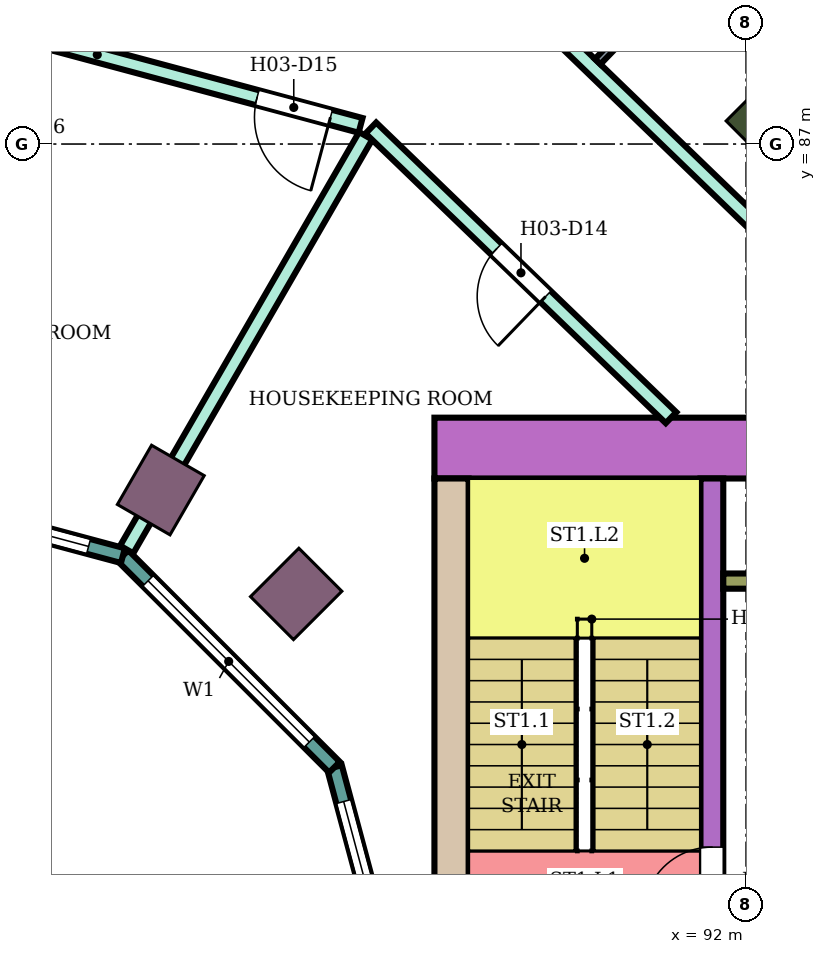
"""IFC4 building model, lengths in metres.
Left out: names, types, materials, properties, quantities, classifications, styles, units other than length and angle.
Written with IfcOpenShell. Run it as: python <this file> out.ifc"""

import sys

from ifc_helpers import new_model, si_unit, direction, frame, frame_2d, origin, origin_2d, place, context, subcontext, project, spatial, rectangle, extrude, element, fill, save


model = new_model("IFC4")
c1 = context("Model", 3, precision=1e-05, world=origin(), true_north=direction((0.0, 1.0)))
c2 = subcontext(c1, "Body", "Model", "MODEL_VIEW")
j1 = project(units=[si_unit("LENGTHUNIT", "METRE"), si_unit("PLANEANGLEUNIT", "RADIAN")], contexts=[c1])
p1 = place(None, origin())
s1 = spatial("IfcSite", under=j1, at=p1, CompositionType="ELEMENT")
p2 = place(p1, origin())
s2 = spatial("IfcBuilding", under=s1, at=p2, CompositionType="ELEMENT")
p3 = place(p2, frame((0.0, 0.0, 55.4)))
s3 = spatial("IfcBuildingStorey", under=s2, at=p3, CompositionType="ELEMENT", Elevation=55.4)
p4 = place(p3, frame((92.445, 87.445, 0.0), z_axis=(0.0, 0.0, 1.0), x_axis=(0.707106781187, 0.707106781187, 0.0)))
e1 = element("IfcColumn", 1, at=p4, inside=s3, PredefinedType="COLUMN", context=c2, shape_type="SweptSolid", body=[
    extrude(rectangle(XDim=1.2, YDim=0.8, at=origin_2d()), origin(), (0.0, 0.0, 1.0), 3.8),
])
for number, where, z_axis, x_axis in (
    (2, (86.081, 81.081, 0.0), (0.0, 0.0, 1.0), (0.707, 0.707, 0.0)),
    (3, (84.3, 82.448, 0.0), (0.0, 0.0, 1.0), (0.5, 0.866, 0.0)),
):
    element("IfcColumn", number, at=place(p3, frame(where, z_axis=z_axis, x_axis=x_axis)), inside=s3, PredefinedType="COLUMN", context=c2, shape_type="SweptSolid", body=[
        extrude(rectangle(XDim=0.9, YDim=0.8, at=origin_2d()), origin(), (0.0, 0.0, 1.0), 3.8),
    ])
p5 = place(p3, frame((87.9, 83.0, 0.0), z_axis=(0.0, 0.0, 1.0), x_axis=(1.0, 0.0, 0.0)))
e4 = element("IfcWall", 4, at=p5, inside=s3, PredefinedType="SHEAR", context=c2, shape_type="SweptSolid", body=[
    extrude(rectangle(XDim=14.7, YDim=0.8, at=frame_2d((7.35, 0.0))), origin(), (0.0, 0.0, 1.0), 3.48),
])
p6 = place(p5, frame((4.2, 0.0, 0.0)))
e5 = element("IfcOpeningElement", 5, at=p6, cuts=e4, PredefinedType="OPENING", context=c2, shape_type="SweptSolid", body=[
    extrude(rectangle(XDim=2.4, YDim=2.4, at=frame_2d((1.2, 1.2))), frame((0.0, 0.41, 0.0), z_axis=(0.0, -1.0, 0.0), x_axis=(1.0, 0.0, 0.0)), (0.0, 0.0, 1.0), 0.82),
])
p7 = place(p3, frame((88.125, 75.0, 0.0), z_axis=(0.0, 0.0, 1.0), x_axis=(0.0, 1.0, 0.0)))
e6 = element("IfcWall", 6, at=p7, inside=s3, PredefinedType="SHEAR", context=c2, shape_type="SweptSolid", body=[
    extrude(rectangle(XDim=7.6, YDim=0.45, at=frame_2d((3.8, 0.0))), origin(), (0.0, 0.0, 1.0), 3.48),
])
p8 = place(p3, frame((91.55, 75.0, 0.0), z_axis=(0.0, 0.0, 1.0), x_axis=(0.0, 1.0, 0.0)))
e7 = element("IfcWall", 7, at=p8, inside=s3, PredefinedType="SHEAR", context=c2, shape_type="SweptSolid", body=[
    extrude(rectangle(XDim=7.6, YDim=0.3, at=frame_2d((3.8, 0.0))), origin(), (0.0, 0.0, 1.0), 3.48),
])
p9 = place(p8, frame((1.85, 0.0, 0.0)))
e8 = element("IfcOpeningElement", 8, at=p9, cuts=e7, PredefinedType="OPENING", context=c2, shape_type="SweptSolid", body=[
    extrude(rectangle(XDim=0.9, YDim=2.1, at=frame_2d((0.45, 1.05))), frame((0.0, 0.16, 0.0), z_axis=(0.0, -1.0, 0.0), x_axis=(1.0, 0.0, 0.0)), (0.0, 0.0, 1.0), 0.32),
])
p10 = place(p3, frame((91.7, 81.25, 0.0), z_axis=(0.0, 0.0, 1.0), x_axis=(1.0, 0.0, 0.0)))
e9 = element("IfcWall", 9, at=p10, inside=s3, PredefinedType="SHEAR", context=c2, shape_type="SweptSolid", body=[
    extrude(rectangle(XDim=4.65, YDim=0.2, at=frame_2d((2.325, 0.0))), origin(), (0.0, 0.0, 1.0), 3.48),
])
p11 = place(p3, frame((87.604, 75.0, 0.0), z_axis=(0.0, 0.0, 1.0), x_axis=(-0.258789828301, 0.965933654434, 0.0)))
e10 = element("IfcWall", 10, at=p11, inside=s3, PredefinedType="NOTDEFINED", context=c2, shape_type="SweptSolid", body=[
    extrude(rectangle(XDim=3.936, YDim=0.2, at=frame_2d((1.968, 0.0))), origin(), (0.0, 0.0, 1.0), 3.8),
])
p12 = place(p11, frame((0.468, 0.0, 0.9)))
e11 = element("IfcOpeningElement", 11, at=p12, cuts=e10, PredefinedType="OPENING", context=c2, shape_type="SweptSolid", body=[
    extrude(rectangle(XDim=3.0, YDim=2.3, at=frame_2d((1.5, 1.15))), frame((0.0, 0.11, 0.0), z_axis=(0.0, -1.0, 0.0), x_axis=(1.0, 0.0, 0.0)), (0.0, 0.0, 1.0), 0.22),
])
p13 = place(p3, frame((86.585, 78.802, 0.0), z_axis=(0.0, 0.0, 1.0), x_axis=(-0.707106781187, 0.707106781187, 0.0)))
e12 = element("IfcWall", 12, at=p13, inside=s3, PredefinedType="NOTDEFINED", context=c2, shape_type="SweptSolid", body=[
    extrude(rectangle(XDim=3.936, YDim=0.2, at=frame_2d((1.968, 0.0))), origin(), (0.0, 0.0, 1.0), 3.8),
])
p14 = place(p13, frame((0.468, 0.0, 0.9)))
e13 = element("IfcOpeningElement", 13, at=p14, cuts=e12, PredefinedType="OPENING", context=c2, shape_type="SweptSolid", body=[
    extrude(rectangle(XDim=3.0, YDim=2.3, at=frame_2d((1.5, 1.15))), frame((0.0, 0.11, 0.0), z_axis=(0.0, -1.0, 0.0), x_axis=(1.0, 0.0, 0.0)), (0.0, 0.0, 1.0), 0.22),
])
p15 = place(p3, frame((83.802, 81.585, 0.0), z_axis=(0.0, 0.0, 1.0), x_axis=(-0.965933654434, 0.258789828301, 0.0)))
e14 = element("IfcWall", 14, at=p15, inside=s3, PredefinedType="NOTDEFINED", context=c2, shape_type="SweptSolid", body=[
    extrude(rectangle(XDim=3.936, YDim=0.2, at=frame_2d((1.968, 0.0))), origin(), (0.0, 0.0, 1.0), 3.8),
])
p16 = place(p15, frame((0.468, 0.0, 0.9)))
e15 = element("IfcOpeningElement", 15, at=p16, cuts=e14, PredefinedType="OPENING", context=c2, shape_type="SweptSolid", body=[
    extrude(rectangle(XDim=3.0, YDim=2.3, at=frame_2d((1.5, 1.15))), frame((0.0, 0.11, 0.0), z_axis=(0.0, -1.0, 0.0), x_axis=(1.0, 0.0, 0.0)), (0.0, 0.0, 1.0), 0.22),
])
p17 = place(p3, frame((80.0, 89.104, 0.0), z_axis=(0.0, 0.0, 1.0), x_axis=(0.965856548257, -0.259077455964, 0.0)))
e16 = element("IfcWall", 16, at=p17, inside=s3, PredefinedType="PARTITIONING", context=c2, shape_type="SweptSolid", body=[
    extrude(rectangle(XDim=7.173, YDim=0.2, at=frame_2d((3.586, 0.0))), origin(), (0.0, 0.0, 1.0), 3.35),
])
p18 = place(p17, frame((5.763, 0.0, 0.0)))
e17 = element("IfcOpeningElement", 17, at=p18, cuts=e16, PredefinedType="OPENING", context=c2, shape_type="SweptSolid", body=[
    extrude(rectangle(XDim=1.0, YDim=2.1, at=frame_2d((0.5, 1.05))), frame((0.0, 0.11, 0.0), z_axis=(0.0, -1.0, 0.0), x_axis=(1.0, 0.0, 0.0)), (0.0, 0.0, 1.0), 0.22),
])
p19 = place(p3, frame((83.851, 81.666, 0.0), z_axis=(0.0, 0.0, 1.0), x_axis=(0.500253653624, 0.865878907259, 0.0)))
e18 = element("IfcWall", 18, at=p19, inside=s3, PredefinedType="PARTITIONING", context=c2, shape_type="SweptSolid", body=[
    extrude(rectangle(XDim=6.285, YDim=0.2, at=frame_2d((3.143, 0.0))), origin(), (0.0, 0.0, 1.0), 3.35),
])
p20 = place(p3, frame((87.064, 87.211, 0.0), z_axis=(0.0, 0.0, 1.0), x_axis=(0.719562412484, -0.694427774891, 0.0)))
e19 = element("IfcWall", 19, at=p20, inside=s3, PredefinedType="PARTITIONING", context=c2, shape_type="SweptSolid", body=[
    extrude(rectangle(XDim=5.488, YDim=0.2, at=frame_2d((2.744, 0.0))), origin(), (0.0, 0.0, 1.0), 3.35),
])
p21 = place(p20, frame((2.294, 0.0, 0.0)))
e20 = element("IfcOpeningElement", 20, at=p21, cuts=e19, PredefinedType="OPENING", context=c2, shape_type="SweptSolid", body=[
    extrude(rectangle(XDim=0.9, YDim=2.1, at=frame_2d((0.45, 1.05))), frame((0.0, 0.11, 0.0), z_axis=(0.0, -1.0, 0.0), x_axis=(1.0, 0.0, 0.0)), (0.0, 0.0, 1.0), 0.22),
])
p22 = place(p3, frame((88.466, 89.473, 0.0), z_axis=(0.0, 0.0, 1.0), x_axis=(0.719346014649, -0.694651935295, 0.0)))
e21 = element("IfcWall", 21, at=p22, inside=s3, PredefinedType="PARTITIONING", context=c2, shape_type="SweptSolid", body=[
    extrude(rectangle(XDim=6.525, YDim=0.2, at=frame_2d((3.263, 0.0))), origin(), (0.0, 0.0, 1.0), 3.35),
])
p23 = place(p22, frame((5.034, 0.0, 0.0)))
e22 = element("IfcOpeningElement", 22, at=p23, cuts=e21, PredefinedType="OPENING", context=c2, shape_type="SweptSolid", body=[
    extrude(rectangle(XDim=1.0, YDim=2.1, at=frame_2d((0.5, 1.05))), frame((0.0, 0.11, 0.0), z_axis=(0.0, -1.0, 0.0), x_axis=(1.0, 0.0, 0.0)), (0.0, 0.0, 1.0), 0.22),
])
p24 = place(p3, frame((90.048, 88.085, 0.0), z_axis=(0.0, 0.0, 1.0), x_axis=(0.694655834207, 0.71934224956, 0.0)))
e23 = element("IfcWall", 23, at=p24, inside=s3, PredefinedType="PARTITIONING", context=c2, shape_type="SweptSolid", body=[
    extrude(rectangle(XDim=2.7, YDim=0.1, at=frame_2d((1.35, 0.0))), origin(), (0.0, 0.0, 1.0), 3.35),
])
p25 = place(p12, origin())
e24 = element("IfcWindow", 24, at=p25, inside=s3, PartitioningType="SINGLE_PANEL", PredefinedType="WINDOW", context=c2, shape_type="SweptSolid", body=[
    extrude(rectangle(XDim=3.0, YDim=2.3, at=frame_2d((1.5, 1.15))), frame((0.0, 0.03, 0.0), z_axis=(0.0, -1.0, 0.0), x_axis=(1.0, 0.0, 0.0)), (0.0, 0.0, 1.0), 0.06),
])
fill(e11, e24)
p26 = place(p14, origin())
e25 = element("IfcWindow", 25, at=p26, inside=s3, PartitioningType="SINGLE_PANEL", PredefinedType="WINDOW", context=c2, shape_type="SweptSolid", body=[
    extrude(rectangle(XDim=3.0, YDim=2.3, at=frame_2d((1.5, 1.15))), frame((0.0, 0.03, 0.0), z_axis=(0.0, -1.0, 0.0), x_axis=(1.0, 0.0, 0.0)), (0.0, 0.0, 1.0), 0.06),
])
fill(e13, e25)
p27 = place(p16, origin())
e26 = element("IfcWindow", 26, at=p27, inside=s3, PartitioningType="SINGLE_PANEL", PredefinedType="WINDOW", context=c2, shape_type="SweptSolid", body=[
    extrude(rectangle(XDim=3.0, YDim=2.3, at=frame_2d((1.5, 1.15))), frame((0.0, 0.03, 0.0), z_axis=(0.0, -1.0, 0.0), x_axis=(1.0, 0.0, 0.0)), (0.0, 0.0, 1.0), 0.06),
])
fill(e15, e26)
p28 = place(p21, frame((0.9, 0.0, 0.0), z_axis=(0.0, 0.0, 1.0), x_axis=(-1.0, 0.0, 0.0)))
e27 = element("IfcDoor", 27, at=p28, inside=s3, OperationType="SINGLE_SWING_LEFT", PredefinedType="DOOR", context=c2, shape_type="SweptSolid", body=[
    extrude(rectangle(XDim=0.9, YDim=2.1, at=frame_2d((0.45, 1.05))), frame((0.0, 0.025, 0.0), z_axis=(0.0, -1.0, 0.0), x_axis=(1.0, 0.0, 0.0)), (0.0, 0.0, 1.0), 0.05),
])
fill(e20, e27)
p29 = place(p18, frame((1.0, 0.0, 0.0), z_axis=(0.0, 0.0, 1.0), x_axis=(-1.0, 0.0, 0.0)))
e28 = element("IfcDoor", 28, at=p29, inside=s3, OperationType="SINGLE_SWING_LEFT", PredefinedType="DOOR", context=c2, shape_type="SweptSolid", body=[
    extrude(rectangle(XDim=1.0, YDim=2.1, at=frame_2d((0.5, 1.05))), frame((0.0, 0.025, 0.0), z_axis=(0.0, -1.0, 0.0), x_axis=(1.0, 0.0, 0.0)), (0.0, 0.0, 1.0), 0.05),
])
fill(e17, e28)
p30 = place(p9, origin())
e29 = element("IfcDoor", 29, at=p30, inside=s3, OperationType="SINGLE_SWING_LEFT", PredefinedType="DOOR", context=c2, shape_type="SweptSolid", body=[
    extrude(rectangle(XDim=0.9, YDim=2.1, at=frame_2d((0.45, 1.05))), frame((0.0, 0.025, 0.0), z_axis=(0.0, -1.0, 0.0), x_axis=(1.0, 0.0, 0.0)), (0.0, 0.0, 1.0), 0.05),
])
fill(e8, e29)
save(model, sys.argv[1])
